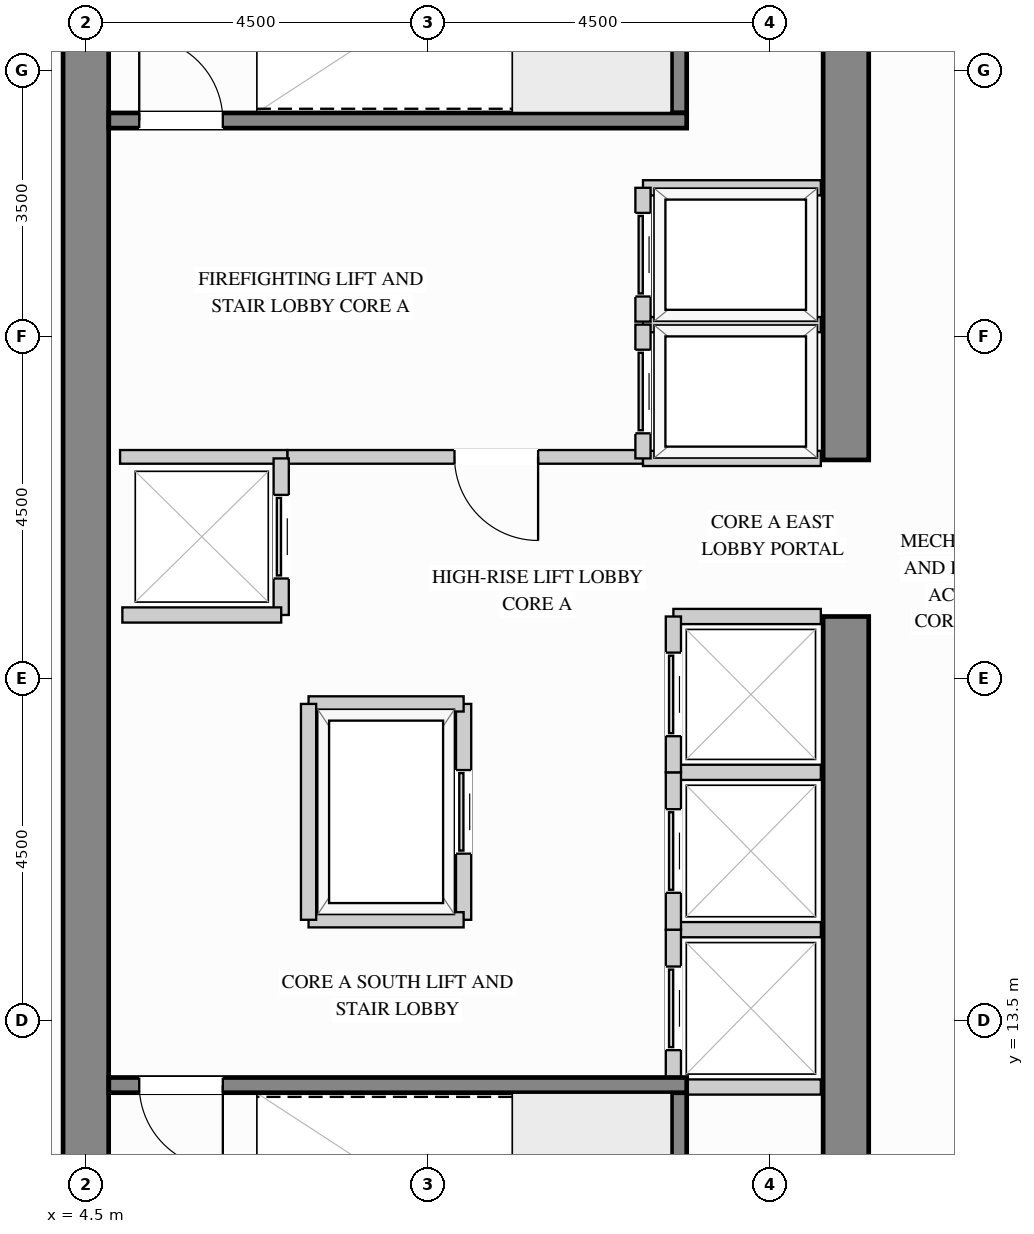
"""IFC4 building model, lengths in metres.
Left out: names, types, materials, properties, quantities, classifications, styles, units other than length and angle.
Written with IfcOpenShell. Run it as: python <this file> out.ifc"""

import sys

from ifc_helpers import new_model, si_unit, direction, frame, frame_2d, origin, place, context, subcontext, project, spatial, rectangle, extrude, source, transform, mapped, element, fill, save


model = new_model("IFC4")
c1 = context("Model", 3, precision=1e-05, world=origin(), true_north=direction((0.0, 1.0)))
c2 = subcontext(c1, "Body", "Model", "MODEL_VIEW")
j1 = project(units=[si_unit("LENGTHUNIT", "METRE"), si_unit("PLANEANGLEUNIT", "RADIAN")], contexts=[c1])
p1 = place(None, origin())
s1 = spatial("IfcSite", under=j1, at=p1, CompositionType="ELEMENT")
p2 = place(p1, origin())
s2 = spatial("IfcBuilding", under=s1, at=p2, CompositionType="ELEMENT")
p3 = place(p2, frame((0.0, 0.0, 207.9)))
s3 = spatial("IfcBuildingStorey", under=s2, at=p3, CompositionType="ELEMENT", Elevation=207.9)
m1 = source(origin(), c2, "Body", "SweptSolid", [
    extrude(rectangle(XDim=10.02, YDim=0.6, at=frame_2d((5.01, 0.0))), origin(), (0.0, 0.0, 1.0), 4.26),
])
p4 = place(p3, frame((14.5, 8.8, 0.0), z_axis=(0.0, 0.0, 1.0), x_axis=(0.0, 1.0, 0.0)))
e1 = element("IfcWall", 1, at=p4, inside=s3, PredefinedType="SHEAR", context=c2, shape_type="MappedRepresentation", body=[
    mapped(m1, transform((0.0, 0.0, 0.0), x_axis=(1.0, 0.0, 0.0), y_axis=(0.0, 1.0, 0.0), z_axis=(0.0, 0.0, 1.0))),
])
m2 = source(origin(), c2, "Body", "SweptSolid", [
    extrude(rectangle(XDim=8.32, YDim=0.6, at=frame_2d((4.16, 0.0))), origin(), (0.0, 0.0, 1.0), 4.26),
])
p5 = place(p3, frame((14.5, 20.88, 0.0), z_axis=(0.0, 0.0, 1.0), x_axis=(0.0, 1.0, 0.0)))
e2 = element("IfcWall", 2, at=p5, inside=s3, PredefinedType="SHEAR", context=c2, shape_type="MappedRepresentation", body=[
    mapped(m2, transform((0.0, 0.0, 0.0), x_axis=(1.0, 0.0, 0.0), y_axis=(0.0, 1.0, 0.0), z_axis=(0.0, 0.0, 1.0))),
])
m3 = source(origin(), c2, "Body", "SweptSolid", [
    extrude(rectangle(XDim=20.4, YDim=0.6, at=frame_2d((10.2, 0.0))), origin(), (0.0, 0.0, 1.0), 4.26),
])
p6 = place(p3, frame((4.5, 8.8, 0.0), z_axis=(0.0, 0.0, 1.0), x_axis=(0.0, 1.0, 0.0)))
e3 = element("IfcWall", 3, at=p6, inside=s3, PredefinedType="SHEAR", context=c2, shape_type="MappedRepresentation", body=[
    mapped(m3, transform((0.0, 0.0, 0.0), x_axis=(1.0, 0.0, 0.0), y_axis=(0.0, 1.0, 0.0), z_axis=(0.0, 0.0, 1.0))),
])
p7 = place(p3, frame((7.15, 20.92, 0.0), z_axis=(0.0, 0.0, 1.0), x_axis=(1.0, 0.0, 0.0)))
e4 = element("IfcWall", 4, at=p7, inside=s3, PredefinedType="PARTITIONING", context=c2, shape_type="SweptSolid", body=[
    extrude(rectangle(XDim=4.68, YDim=0.18, at=frame_2d((2.34, 0.0))), origin(), (0.0, 0.0, 1.0), 4.245),
])
p8 = place(p7, frame((2.2, 0.0, 0.0)))
e5 = element("IfcOpeningElement", 5, at=p8, cuts=e4, PredefinedType="OPENING", context=c2, shape_type="SweptSolid", body=[
    extrude(rectangle(XDim=1.1, YDim=2.15, at=frame_2d((0.55, 1.075))), frame((0.0, 0.1, 0.0), z_axis=(0.0, -1.0, 0.0), x_axis=(1.0, 0.0, 0.0)), (0.0, 0.0, 1.0), 0.2),
])
m4 = source(origin(), c2, "Body", "SweptSolid", [
    extrude(rectangle(XDim=2.2, YDim=0.18, at=frame_2d((1.1, 0.0))), origin(), (0.0, 0.0, 1.0), 4.245),
])
p9 = place(p3, frame((4.95, 20.92, 0.0), z_axis=(0.0, 0.0, 1.0), x_axis=(1.0, 0.0, 0.0)))
e6 = element("IfcWall", 6, at=p9, inside=s3, PredefinedType="PARTITIONING", context=c2, shape_type="MappedRepresentation", body=[
    mapped(m4, transform((0.0, 0.0, 0.0), x_axis=(1.0, 0.0, 0.0), y_axis=(0.0, 1.0, 0.0), z_axis=(0.0, 0.0, 1.0))),
])
m5 = source(origin(), c2, "Body", "SweptSolid", [
    extrude(rectangle(XDim=2.34, YDim=0.2, at=frame_2d((1.17, 0.0))), origin(), (0.0, 0.0, 1.0), 4.245),
])
for number, where, z_axis, x_axis in (
    (7, (11.83, 22.66, 0.0), (0.0, 0.0, 1.0), (1.0, 0.0, 0.0)),
    (8, (11.83, 20.9, 0.0), (0.0, 0.0, 1.0), (1.0, 0.0, 0.0)),
):
    element("IfcWall", number, at=place(p3, frame(where, z_axis=z_axis, x_axis=x_axis)), inside=s3, PredefinedType="PARTITIONING", context=c2, shape_type="MappedRepresentation", body=[
        mapped(m5, transform((0.0, 0.0, 0.0), x_axis=(1.0, 0.0, 0.0), y_axis=(0.0, 1.0, 0.0), z_axis=(0.0, 0.0, 1.0))),
    ])
p10 = place(p3, frame((11.83, 20.9, 0.0), z_axis=(0.0, 0.0, 1.0), x_axis=(0.0, 1.0, 0.0)))
e9 = element("IfcWall", 9, at=p10, inside=s3, PredefinedType="PARTITIONING", context=c2, shape_type="SweptSolid", body=[
    extrude(rectangle(XDim=1.76, YDim=0.2, at=frame_2d((0.88, 0.0))), origin(), (0.0, 0.0, 1.0), 4.245),
])
p11 = place(p10, frame((0.33, 0.0, 0.0)))
e10 = element("IfcOpeningElement", 10, at=p11, cuts=e9, PredefinedType="OPENING", context=c2, shape_type="SweptSolid", body=[
    extrude(rectangle(XDim=1.1, YDim=2.2, at=frame_2d((0.55, 1.1))), frame((0.0, 0.11, 0.0), z_axis=(0.0, -1.0, 0.0), x_axis=(1.0, 0.0, 0.0)), (0.0, 0.0, 1.0), 0.22),
])
p12 = place(p3, frame((11.83, 24.46, 0.0), z_axis=(0.0, 0.0, 1.0), x_axis=(1.0, 0.0, 0.0)))
e11 = element("IfcWall", 11, at=p12, inside=s3, PredefinedType="PARTITIONING", context=c2, shape_type="MappedRepresentation", body=[
    mapped(m5, transform((0.0, 0.0, 0.0), x_axis=(1.0, 0.0, 0.0), y_axis=(0.0, 1.0, 0.0), z_axis=(0.0, 0.0, 1.0))),
])
p13 = place(p3, frame((11.83, 22.7, 0.0), z_axis=(0.0, 0.0, 1.0), x_axis=(0.0, 1.0, 0.0)))
e12 = element("IfcWall", 12, at=p13, inside=s3, PredefinedType="PARTITIONING", context=c2, shape_type="SweptSolid", body=[
    extrude(rectangle(XDim=1.76, YDim=0.2, at=frame_2d((0.88, 0.0))), origin(), (0.0, 0.0, 1.0), 4.245),
])
p14 = place(p13, frame((0.33, 0.0, 0.0)))
e13 = element("IfcOpeningElement", 13, at=p14, cuts=e12, PredefinedType="OPENING", context=c2, shape_type="SweptSolid", body=[
    extrude(rectangle(XDim=1.1, YDim=2.2, at=frame_2d((0.55, 1.1))), frame((0.0, 0.11, 0.0), z_axis=(0.0, -1.0, 0.0), x_axis=(1.0, 0.0, 0.0)), (0.0, 0.0, 1.0), 0.22),
])
m6 = source(origin(), c2, "Body", "SweptSolid", [
    extrude(rectangle(XDim=1.94, YDim=0.2, at=frame_2d((0.97, 0.0))), origin(), (0.0, 0.0, 1.0), 4.245),
])
for number, where, z_axis, x_axis in (
    (14, (12.23, 14.7, 0.0), (0.0, 0.0, 1.0), (1.0, 0.0, 0.0)),
    (15, (12.23, 12.63, 0.0), (0.0, 0.0, 1.0), (1.0, 0.0, 0.0)),
):
    element("IfcWall", number, at=place(p3, frame(where, z_axis=z_axis, x_axis=x_axis)), inside=s3, PredefinedType="PARTITIONING", context=c2, shape_type="MappedRepresentation", body=[
        mapped(m6, transform((0.0, 0.0, 0.0), x_axis=(1.0, 0.0, 0.0), y_axis=(0.0, 1.0, 0.0), z_axis=(0.0, 0.0, 1.0))),
    ])
p15 = place(p3, frame((12.23, 12.63, 0.0), z_axis=(0.0, 0.0, 1.0), x_axis=(0.0, 1.0, 0.0)))
e16 = element("IfcWall", 16, at=p15, inside=s3, PredefinedType="PARTITIONING", context=c2, shape_type="SweptSolid", body=[
    extrude(rectangle(XDim=2.07, YDim=0.2, at=frame_2d((1.035, 0.0))), origin(), (0.0, 0.0, 1.0), 4.245),
])
p16 = place(p15, frame((0.485, 0.0, 0.0)))
e17 = element("IfcOpeningElement", 17, at=p16, cuts=e16, PredefinedType="OPENING", context=c2, shape_type="SweptSolid", body=[
    extrude(rectangle(XDim=1.1, YDim=2.2, at=frame_2d((0.55, 1.1))), frame((0.0, 0.11, 0.0), z_axis=(0.0, -1.0, 0.0), x_axis=(1.0, 0.0, 0.0)), (0.0, 0.0, 1.0), 0.22),
])
p17 = place(p3, frame((12.23, 16.77, 0.0), z_axis=(0.0, 0.0, 1.0), x_axis=(1.0, 0.0, 0.0)))
e18 = element("IfcWall", 18, at=p17, inside=s3, PredefinedType="PARTITIONING", context=c2, shape_type="MappedRepresentation", body=[
    mapped(m6, transform((0.0, 0.0, 0.0), x_axis=(1.0, 0.0, 0.0), y_axis=(0.0, 1.0, 0.0), z_axis=(0.0, 0.0, 1.0))),
])
p18 = place(p3, frame((12.23, 14.7, 0.0), z_axis=(0.0, 0.0, 1.0), x_axis=(0.0, 1.0, 0.0)))
e19 = element("IfcWall", 19, at=p18, inside=s3, PredefinedType="PARTITIONING", context=c2, shape_type="SweptSolid", body=[
    extrude(rectangle(XDim=2.07, YDim=0.2, at=frame_2d((1.035, 0.0))), origin(), (0.0, 0.0, 1.0), 4.245),
])
p19 = place(p18, frame((0.485, 0.0, 0.0)))
e20 = element("IfcOpeningElement", 20, at=p19, cuts=e19, PredefinedType="OPENING", context=c2, shape_type="SweptSolid", body=[
    extrude(rectangle(XDim=1.1, YDim=2.2, at=frame_2d((0.55, 1.1))), frame((0.0, 0.11, 0.0), z_axis=(0.0, -1.0, 0.0), x_axis=(1.0, 0.0, 0.0)), (0.0, 0.0, 1.0), 0.22),
])
p20 = place(p3, frame((12.23, 18.82, 0.0), z_axis=(0.0, 0.0, 1.0), x_axis=(1.0, 0.0, 0.0)))
e21 = element("IfcWall", 21, at=p20, inside=s3, PredefinedType="PARTITIONING", context=c2, shape_type="MappedRepresentation", body=[
    mapped(m6, transform((0.0, 0.0, 0.0), x_axis=(1.0, 0.0, 0.0), y_axis=(0.0, 1.0, 0.0), z_axis=(0.0, 0.0, 1.0))),
])
p21 = place(p3, frame((12.23, 16.77, 0.0), z_axis=(0.0, 0.0, 1.0), x_axis=(0.0, 1.0, 0.0)))
e22 = element("IfcWall", 22, at=p21, inside=s3, PredefinedType="PARTITIONING", context=c2, shape_type="SweptSolid", body=[
    extrude(rectangle(XDim=2.05, YDim=0.2, at=frame_2d((1.025, 0.0))), origin(), (0.0, 0.0, 1.0), 4.245),
])
p22 = place(p21, frame((0.475, 0.0, 0.0)))
e23 = element("IfcOpeningElement", 23, at=p22, cuts=e22, PredefinedType="OPENING", context=c2, shape_type="SweptSolid", body=[
    extrude(rectangle(XDim=1.1, YDim=2.2, at=frame_2d((0.55, 1.1))), frame((0.0, 0.11, 0.0), z_axis=(0.0, -1.0, 0.0), x_axis=(1.0, 0.0, 0.0)), (0.0, 0.0, 1.0), 0.22),
])
p23 = place(p3, frame((7.07, 18.84, 0.0), z_axis=(0.0, 0.0, 1.0), x_axis=(0.0, 1.0, 0.0)))
e24 = element("IfcWall", 24, at=p23, inside=s3, PredefinedType="PARTITIONING", context=c2, shape_type="SweptSolid", body=[
    extrude(rectangle(XDim=2.06, YDim=0.2, at=frame_2d((1.03, 0.0))), origin(), (0.0, 0.0, 1.0), 4.245),
])
p24 = place(p23, frame((0.48, 0.0, 0.0)))
e25 = element("IfcOpeningElement", 25, at=p24, cuts=e24, PredefinedType="OPENING", context=c2, shape_type="SweptSolid", body=[
    extrude(rectangle(XDim=1.1, YDim=2.2, at=frame_2d((0.55, 1.1))), frame((0.0, 0.11, 0.0), z_axis=(0.0, -1.0, 0.0), x_axis=(1.0, 0.0, 0.0)), (0.0, 0.0, 1.0), 0.22),
])
m7 = source(origin(), c2, "Body", "SweptSolid", [
    extrude(rectangle(XDim=2.09, YDim=0.2, at=frame_2d((1.045, 0.0))), origin(), (0.0, 0.0, 1.0), 4.245),
])
p25 = place(p3, frame((4.98, 18.84, 0.0), z_axis=(0.0, 0.0, 1.0), x_axis=(1.0, 0.0, 0.0)))
e26 = element("IfcWall", 26, at=p25, inside=s3, PredefinedType="PARTITIONING", context=c2, shape_type="MappedRepresentation", body=[
    mapped(m7, transform((0.0, 0.0, 0.0), x_axis=(1.0, 0.0, 0.0), y_axis=(0.0, 1.0, 0.0), z_axis=(0.0, 0.0, 1.0))),
])
p26 = place(p3, frame((9.47, 14.83, 0.0), z_axis=(0.0, 0.0, 1.0), x_axis=(0.0, 1.0, 0.0)))
e27 = element("IfcWall", 27, at=p26, inside=s3, PredefinedType="PARTITIONING", context=c2, shape_type="SweptSolid", body=[
    extrude(rectangle(XDim=2.84, YDim=0.2, at=frame_2d((1.42, 0.0))), origin(), (0.0, 0.0, 1.0), 4.245),
])
p27 = place(p26, frame((0.87, 0.0, 0.0)))
e28 = element("IfcOpeningElement", 28, at=p27, cuts=e27, PredefinedType="OPENING", context=c2, shape_type="SweptSolid", body=[
    extrude(rectangle(XDim=1.1, YDim=2.2, at=frame_2d((0.55, 1.1))), frame((0.0, 0.11, 0.0), z_axis=(0.0, -1.0, 0.0), x_axis=(1.0, 0.0, 0.0)), (0.0, 0.0, 1.0), 0.22),
])
m8 = source(origin(), c2, "Body", "SweptSolid", [
    extrude(rectangle(XDim=2.04, YDim=0.2, at=frame_2d((1.02, 0.0))), origin(), (0.0, 0.0, 1.0), 4.245),
])
for number, where, z_axis, x_axis in (
    (29, (7.43, 17.67, 0.0), (0.0, 0.0, 1.0), (1.0, 0.0, 0.0)),
    (30, (7.43, 14.83, 0.0), (0.0, 0.0, 1.0), (1.0, 0.0, 0.0)),
):
    element("IfcWall", number, at=place(p3, frame(where, z_axis=z_axis, x_axis=x_axis)), inside=s3, PredefinedType="PARTITIONING", context=c2, shape_type="MappedRepresentation", body=[
        mapped(m8, transform((0.0, 0.0, 0.0), x_axis=(1.0, 0.0, 0.0), y_axis=(0.0, 1.0, 0.0), z_axis=(0.0, 0.0, 1.0))),
    ])
m9 = source(origin(), c2, "Body", "SweptSolid", [
    extrude(rectangle(XDim=2.84, YDim=0.2, at=frame_2d((1.42, 0.0))), origin(), (0.0, 0.0, 1.0), 4.245),
])
p28 = place(p3, frame((7.43, 14.83, 0.0), z_axis=(0.0, 0.0, 1.0), x_axis=(0.0, 1.0, 0.0)))
e31 = element("IfcWall", 31, at=p28, inside=s3, PredefinedType="PARTITIONING", context=c2, shape_type="MappedRepresentation", body=[
    mapped(m9, transform((0.0, 0.0, 0.0), x_axis=(1.0, 0.0, 0.0), y_axis=(0.0, 1.0, 0.0), z_axis=(0.0, 0.0, 1.0))),
])
m10 = source(origin(), c2, "Body", "SweptSolid", [
    extrude(rectangle(XDim=3.753, YDim=0.2, at=frame_2d((1.876, 0.0))), origin(), (0.0, 0.0, 1.0), 4.26),
])
p29 = place(p3, frame((12.305, 8.802, 0.0), z_axis=(0.0, 0.0, 1.0), x_axis=(0.0, 1.0, 0.0)))
e32 = element("IfcWall", 32, at=p29, inside=s3, PredefinedType="SHEAR", context=c2, shape_type="MappedRepresentation", body=[
    mapped(m10, transform((0.0, 0.0, 0.0), x_axis=(1.0, 0.0, 0.0), y_axis=(0.0, 1.0, 0.0), z_axis=(0.0, 0.0, 1.0))),
])
p30 = place(p3, frame((4.802, 12.655, 0.0), z_axis=(0.0, 0.0, 1.0), x_axis=(1.0, 0.0, 0.0)))
e33 = element("IfcWall", 33, at=p30, inside=s3, PredefinedType="SHEAR", context=c2, shape_type="SweptSolid", body=[
    extrude(rectangle(XDim=7.603, YDim=0.2, at=frame_2d((3.802, 0.0))), origin(), (0.0, 0.0, 1.0), 4.26),
])
p31 = place(p30, frame((0.4, 0.0, 0.0)))
e34 = element("IfcOpeningElement", 34, at=p31, cuts=e33, PredefinedType="OPENING", context=c2, shape_type="SweptSolid", body=[
    extrude(rectangle(XDim=1.1, YDim=2.15, at=frame_2d((0.55, 1.075))), frame((0.0, 0.11, 0.0), z_axis=(0.0, -1.0, 0.0), x_axis=(1.0, 0.0, 0.0)), (0.0, 0.0, 1.0), 0.22),
])
p32 = place(p3, frame((12.305, 25.445, 0.0), z_axis=(0.0, 0.0, 1.0), x_axis=(0.0, 1.0, 0.0)))
e35 = element("IfcWall", 35, at=p32, inside=s3, PredefinedType="SHEAR", context=c2, shape_type="MappedRepresentation", body=[
    mapped(m10, transform((0.0, 0.0, 0.0), x_axis=(1.0, 0.0, 0.0), y_axis=(0.0, 1.0, 0.0), z_axis=(0.0, 0.0, 1.0))),
])
p33 = place(p3, frame((4.802, 25.345, 0.0), z_axis=(0.0, 0.0, 1.0), x_axis=(1.0, 0.0, 0.0)))
e36 = element("IfcWall", 36, at=p33, inside=s3, PredefinedType="SHEAR", context=c2, shape_type="SweptSolid", body=[
    extrude(rectangle(XDim=7.603, YDim=0.2, at=frame_2d((3.802, 0.0))), origin(), (0.0, 0.0, 1.0), 4.26),
])
p34 = place(p33, frame((0.4, 0.0, 0.0)))
e37 = element("IfcOpeningElement", 37, at=p34, cuts=e36, PredefinedType="OPENING", context=c2, shape_type="SweptSolid", body=[
    extrude(rectangle(XDim=1.1, YDim=2.15, at=frame_2d((0.55, 1.075))), frame((0.0, 0.11, 0.0), z_axis=(0.0, -1.0, 0.0), x_axis=(1.0, 0.0, 0.0)), (0.0, 0.0, 1.0), 0.22),
])
m11 = source(origin(), c2, "Body", "SweptSolid", [
    extrude(rectangle(XDim=1.1, YDim=2.15, at=frame_2d((0.55, 1.075))), frame((0.0, 0.025, 0.0), z_axis=(0.0, -1.0, 0.0), x_axis=(1.0, 0.0, 0.0)), (0.0, 0.0, 1.0), 0.05),
])
p35 = place(p8, origin())
e38 = element("IfcDoor", 38, at=p35, inside=s3, OperationType="SINGLE_SWING_RIGHT", PredefinedType="DOOR", context=c2, shape_type="MappedRepresentation", body=[
    mapped(m11, transform((0.0, 0.0, 0.0), x_axis=(1.0, 0.0, 0.0), y_axis=(0.0, 1.0, 0.0), z_axis=(0.0, 0.0, 1.0))),
])
fill(e5, e38)
m12 = source(origin(), c2, "Body", "SweptSolid", [
    extrude(rectangle(XDim=1.1, YDim=2.2, at=frame_2d((0.55, 1.1))), frame((0.0, 0.025, 0.0), z_axis=(0.0, -1.0, 0.0), x_axis=(1.0, 0.0, 0.0)), (0.0, 0.0, 1.0), 0.05),
])
p36 = place(p11, origin())
e39 = element("IfcDoor", 39, at=p36, inside=s3, OperationType="SLIDING_TO_LEFT", PredefinedType="DOOR", context=c2, shape_type="MappedRepresentation", body=[
    mapped(m12, transform((0.0, 0.0, 0.0), x_axis=(1.0, 0.0, 0.0), y_axis=(0.0, 1.0, 0.0), z_axis=(0.0, 0.0, 1.0))),
])
fill(e10, e39)
p37 = place(p14, origin())
e40 = element("IfcDoor", 40, at=p37, inside=s3, OperationType="SLIDING_TO_LEFT", PredefinedType="DOOR", context=c2, shape_type="MappedRepresentation", body=[
    mapped(m12, transform((0.0, 0.0, 0.0), x_axis=(1.0, 0.0, 0.0), y_axis=(0.0, 1.0, 0.0), z_axis=(0.0, 0.0, 1.0))),
])
fill(e13, e40)
p38 = place(p16, origin())
e41 = element("IfcDoor", 41, at=p38, inside=s3, OperationType="SLIDING_TO_LEFT", PredefinedType="DOOR", context=c2, shape_type="MappedRepresentation", body=[
    mapped(m12, transform((0.0, 0.0, 0.0), x_axis=(1.0, 0.0, 0.0), y_axis=(0.0, 1.0, 0.0), z_axis=(0.0, 0.0, 1.0))),
])
fill(e17, e41)
p39 = place(p19, origin())
e42 = element("IfcDoor", 42, at=p39, inside=s3, OperationType="SLIDING_TO_LEFT", PredefinedType="DOOR", context=c2, shape_type="MappedRepresentation", body=[
    mapped(m12, transform((0.0, 0.0, 0.0), x_axis=(1.0, 0.0, 0.0), y_axis=(0.0, 1.0, 0.0), z_axis=(0.0, 0.0, 1.0))),
])
fill(e20, e42)
p40 = place(p22, origin())
e43 = element("IfcDoor", 43, at=p40, inside=s3, OperationType="SLIDING_TO_LEFT", PredefinedType="DOOR", context=c2, shape_type="MappedRepresentation", body=[
    mapped(m12, transform((0.0, 0.0, 0.0), x_axis=(1.0, 0.0, 0.0), y_axis=(0.0, 1.0, 0.0), z_axis=(0.0, 0.0, 1.0))),
])
fill(e23, e43)
p41 = place(p24, origin())
e44 = element("IfcDoor", 44, at=p41, inside=s3, OperationType="SLIDING_TO_LEFT", PredefinedType="DOOR", context=c2, shape_type="MappedRepresentation", body=[
    mapped(m12, transform((0.0, 0.0, 0.0), x_axis=(1.0, 0.0, 0.0), y_axis=(0.0, 1.0, 0.0), z_axis=(0.0, 0.0, 1.0))),
])
fill(e25, e44)
p42 = place(p27, origin())
e45 = element("IfcDoor", 45, at=p42, inside=s3, OperationType="SLIDING_TO_LEFT", PredefinedType="DOOR", context=c2, shape_type="MappedRepresentation", body=[
    mapped(m12, transform((0.0, 0.0, 0.0), x_axis=(1.0, 0.0, 0.0), y_axis=(0.0, 1.0, 0.0), z_axis=(0.0, 0.0, 1.0))),
])
fill(e28, e45)
m13 = source(origin(), c2, "Body", "SweptSolid", [
    extrude(rectangle(XDim=1.1, YDim=2.15, at=frame_2d((0.55, 1.075))), frame((0.0, 0.025, 0.0), z_axis=(0.0, -1.0, 0.0), x_axis=(1.0, 0.0, 0.0)), (0.0, 0.0, 1.0), 0.05),
])
p43 = place(p31, origin())
e46 = element("IfcDoor", 46, at=p43, inside=s3, OperationType="SINGLE_SWING_RIGHT", PredefinedType="DOOR", context=c2, shape_type="MappedRepresentation", body=[
    mapped(m13, transform((0.0, 0.0, 0.0), x_axis=(1.0, 0.0, 0.0), y_axis=(0.0, 1.0, 0.0), z_axis=(0.0, 0.0, 1.0))),
])
fill(e34, e46)
p44 = place(p34, origin())
e47 = element("IfcDoor", 47, at=p44, inside=s3, OperationType="SINGLE_SWING_LEFT", PredefinedType="DOOR", context=c2, shape_type="MappedRepresentation", body=[
    mapped(m13, transform((0.0, 0.0, 0.0), x_axis=(1.0, 0.0, 0.0), y_axis=(0.0, 1.0, 0.0), z_axis=(0.0, 0.0, 1.0))),
])
fill(e37, e47)
save(model, sys.argv[1])
